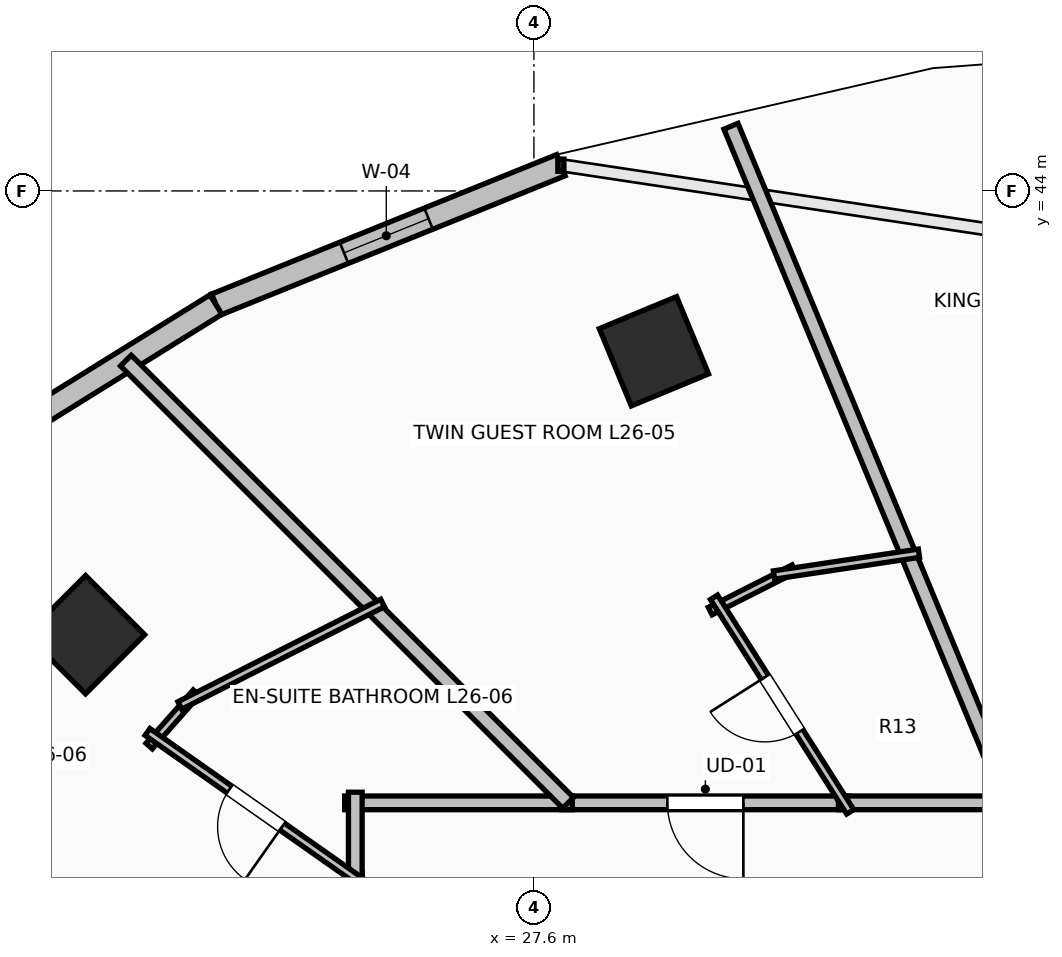
"""IFC4 building model, lengths in metres.
Left out: names, types, materials, properties, quantities, classifications, styles, units other than length and angle.
Written with IfcOpenShell. Run it as: python <this file> out.ifc"""

import sys

from ifc_helpers import new_model, si_unit, direction, frame, frame_2d, origin, origin_2d, place, context, subcontext, project, spatial, rectangle, extrude, element, fill, save


model = new_model("IFC4")
c1 = context("Model", 3, precision=1e-05, world=origin(), true_north=direction((0.0, 1.0)))
c2 = subcontext(c1, "Body", "Model", "MODEL_VIEW")
j1 = project(units=[si_unit("LENGTHUNIT", "METRE"), si_unit("PLANEANGLEUNIT", "RADIAN")], contexts=[c1])
p1 = place(None, origin())
s1 = spatial("IfcSite", under=j1, at=p1, CompositionType="ELEMENT")
p2 = place(p1, origin())
s2 = spatial("IfcBuilding", under=s1, at=p2, CompositionType="ELEMENT")
p3 = place(p2, frame((0.0, 0.0, 99.8)))
s3 = spatial("IfcBuildingStorey", under=s2, at=p3, CompositionType="ELEMENT", Elevation=99.8)
for number, where, z_axis, x_axis in (
    (1, (29.179, 41.891, 0.0), (0.0, 0.0, 1.0), (-0.383, 0.924, 0.0)),
    (2, (21.701, 38.162, 0.0), (0.0, 0.0, 1.0), (-0.707, 0.707, 0.0)),
):
    element("IfcColumn", number, at=place(p3, frame(where, z_axis=z_axis, x_axis=x_axis)), inside=s3, PredefinedType="COLUMN", context=c2, shape_type="SweptSolid", body=[
        extrude(rectangle(XDim=1.1, YDim=1.1, at=origin_2d()), origin(), (0.0, 0.0, 1.0), 3.5),
    ])
p4 = place(p3, frame((27.955, 44.339, 0.0), z_axis=(0.0, 0.0, 1.0), x_axis=(-0.927122233109, -0.374759075775, 0.0)))
e3 = element("IfcWall", 3, at=p4, inside=s3, PredefinedType="STANDARD", context=c2, shape_type="SweptSolid", body=[
    extrude(rectangle(XDim=4.895, YDim=0.3, at=frame_2d((2.448, 0.0))), origin(), (0.0, 0.0, 1.0), 3.24),
])
p5 = place(p4, frame((1.877, 0.0, 0.85)))
e4 = element("IfcOpeningElement", 4, at=p5, cuts=e3, PredefinedType="OPENING", context=c2, shape_type="SweptSolid", body=[
    extrude(rectangle(XDim=1.2, YDim=1.95, at=frame_2d((0.6, 0.975))), frame((0.0, 0.165, 0.0), z_axis=(0.0, -1.0, 0.0), x_axis=(1.0, 0.0, 0.0)), (0.0, 0.0, 1.0), 0.33),
])
p6 = place(p3, frame((23.416, 42.505, 0.0), z_axis=(0.0, 0.0, 1.0), x_axis=(-0.849684479743, -0.527291461038, 0.0)))
e5 = element("IfcWall", 5, at=p6, inside=s3, PredefinedType="STANDARD", context=c2, shape_type="SweptSolid", body=[
    extrude(rectangle(XDim=4.681, YDim=0.3, at=frame_2d((2.341, 0.0))), origin(), (0.0, 0.0, 1.0), 3.24),
])
p7 = place(p3, frame((31.746, 35.95, 0.0), z_axis=(0.0, 0.0, 1.0), x_axis=(-1.0, 0.0, 0.0)))
e6 = element("IfcWall", 6, at=p7, inside=s3, PredefinedType="PARTITIONING", context=c2, shape_type="SweptSolid", body=[
    extrude(rectangle(XDim=3.781, YDim=0.18, at=frame_2d((1.891, 0.0))), origin(), (0.0, 0.0, 1.0), 2.432),
])
p8 = place(p7, frame((1.39, 0.0, 0.0)))
e7 = element("IfcOpeningElement", 7, at=p8, cuts=e6, PredefinedType="OPENING", context=c2, shape_type="SweptSolid", body=[
    extrude(rectangle(XDim=1.0, YDim=2.15, at=frame_2d((0.5, 1.075))), frame((0.0, 0.105, 0.0), z_axis=(0.0, -1.0, 0.0), x_axis=(1.0, 0.0, 0.0)), (0.0, 0.0, 1.0), 0.21),
])
p9 = place(p3, frame((33.954, 35.95, 0.0), z_axis=(0.0, 0.0, 1.0), x_axis=(-1.0, 0.0, 0.0)))
e8 = element("IfcWall", 8, at=p9, inside=s3, PredefinedType="PARTITIONING", context=c2, shape_type="SweptSolid", body=[
    extrude(rectangle(XDim=2.348, YDim=0.18, at=frame_2d((1.174, 0.0))), origin(), (0.0, 0.0, 1.0), 3.24),
])
p10 = place(p3, frame((25.25, 35.034, 0.0), z_axis=(0.0, 0.0, 1.0), x_axis=(0.0, -1.0, 0.0)))
e9 = element("IfcWall", 9, at=p10, inside=s3, PredefinedType="PARTITIONING", context=c2, shape_type="SweptSolid", body=[
    extrude(rectangle(XDim=3.813, YDim=0.18, at=frame_2d((1.906, 0.0))), origin(), (0.0, 0.0, 1.0), 2.432),
])
p11 = place(p10, frame((1.406, 0.0, 0.0)))
e10 = element("IfcOpeningElement", 10, at=p11, cuts=e9, PredefinedType="OPENING", context=c2, shape_type="SweptSolid", body=[
    extrude(rectangle(XDim=1.0, YDim=2.15, at=frame_2d((0.5, 1.075))), frame((0.0, 0.105, 0.0), z_axis=(0.0, -1.0, 0.0), x_axis=(1.0, 0.0, 0.0)), (0.0, 0.0, 1.0), 0.21),
])
p12 = place(p3, frame((28.105, 35.95, 0.0), z_axis=(0.0, 0.0, 1.0), x_axis=(-1.0, 0.0, 0.0)))
e11 = element("IfcWall", 11, at=p12, inside=s3, PredefinedType="PARTITIONING", context=c2, shape_type="SweptSolid", body=[
    extrude(rectangle(XDim=2.995, YDim=0.18, at=frame_2d((1.498, 0.0))), origin(), (0.0, 0.0, 1.0), 2.432),
])
p13 = place(p3, frame((25.25, 36.09, 0.0), z_axis=(0.0, 0.0, 1.0), x_axis=(0.0, -1.0, 0.0)))
e12 = element("IfcWall", 12, at=p13, inside=s3, PredefinedType="PARTITIONING", context=c2, shape_type="SweptSolid", body=[
    extrude(rectangle(XDim=1.196, YDim=0.18, at=frame_2d((0.598, 0.0))), origin(), (0.0, 0.0, 1.0), 2.432),
])
p14 = place(p3, frame((30.192, 44.851, 0.0), z_axis=(0.0, 0.0, 1.0), x_axis=(0.382687492799, -0.923877850614, 0.0)))
e13 = element("IfcWall", 13, at=p14, inside=s3, PredefinedType="PARTITIONING", context=c2, shape_type="SweptSolid", body=[
    extrude(rectangle(XDim=9.635, YDim=0.2, at=frame_2d((4.817, 0.0))), origin(), (0.0, 0.0, 1.0), 2.432),
])
p15 = place(p3, frame((29.919, 38.473, 0.0), z_axis=(0.0, 0.0, 1.0), x_axis=(0.892084606746, 0.45186840386, 0.0)))
e14 = element("IfcWall", 14, at=p15, inside=s3, PredefinedType="PARTITIONING", context=c2, shape_type="SweptSolid", body=[
    extrude(rectangle(XDim=1.236, YDim=0.11, at=frame_2d((0.618, 0.0))), origin(), (0.0, 0.0, 1.0), 3.24),
])
p16 = place(p3, frame((30.759, 38.947, 0.0), z_axis=(0.0, 0.0, 1.0), x_axis=(0.988889867338, 0.148650026153, 0.0)))
e15 = element("IfcWall", 15, at=p16, inside=s3, PredefinedType="PARTITIONING", context=c2, shape_type="SweptSolid", body=[
    extrude(rectangle(XDim=1.928, YDim=0.11, at=frame_2d((0.964, 0.0))), origin(), (0.0, 0.0, 1.0), 3.24),
])
p17 = place(p3, frame((31.761, 35.832, 0.0), z_axis=(0.0, 0.0, 1.0), x_axis=(-0.535991614842, 0.844223305067, 0.0)))
e16 = element("IfcWall", 16, at=p17, inside=s3, PredefinedType="PARTITIONING", context=c2, shape_type="SweptSolid", body=[
    extrude(rectangle(XDim=3.343, YDim=0.11, at=frame_2d((1.672, 0.0))), origin(), (0.0, 0.0, 1.0), 2.432),
])
p18 = place(p17, frame((1.247, 0.0, 0.0)))
e17 = element("IfcOpeningElement", 17, at=p18, cuts=e16, PredefinedType="OPENING", context=c2, shape_type="SweptSolid", body=[
    extrude(rectangle(XDim=0.85, YDim=2.1, at=frame_2d((0.425, 1.05))), frame((0.0, 0.07, 0.0), z_axis=(0.0, -1.0, 0.0), x_axis=(1.0, 0.0, 0.0)), (0.0, 0.0, 1.0), 0.14),
])
p19 = place(p3, frame((22.232, 41.768, 0.0), z_axis=(0.0, 0.0, 1.0), x_axis=(0.707106781187, -0.707106781187, 0.0)))
e18 = element("IfcWall", 18, at=p19, inside=s3, PredefinedType="PARTITIONING", context=c2, shape_type="SweptSolid", body=[
    extrude(rectangle(XDim=8.228, YDim=0.2, at=frame_2d((4.114, 0.0))), origin(), (0.0, 0.0, 1.0), 2.432),
])
p20 = place(p3, frame((22.538, 36.697, 0.0), z_axis=(0.0, 0.0, 1.0), x_axis=(0.662242037053, 0.749289986827, 0.0)))
e19 = element("IfcWall", 19, at=p20, inside=s3, PredefinedType="PARTITIONING", context=c2, shape_type="SweptSolid", body=[
    extrude(rectangle(XDim=0.937, YDim=0.11, at=frame_2d((0.468, 0.0))), origin(), (0.0, 0.0, 1.0), 2.432),
])
p21 = place(p3, frame((22.941, 37.231, 0.0), z_axis=(0.0, 0.0, 1.0), x_axis=(0.892507731149, 0.451032094024, 0.0)))
e20 = element("IfcWall", 20, at=p21, inside=s3, PredefinedType="PARTITIONING", context=c2, shape_type="SweptSolid", body=[
    extrude(rectangle(XDim=2.989, YDim=0.11, at=frame_2d((1.495, 0.0))), origin(), (0.0, 0.0, 1.0), 2.432),
])
p22 = place(p3, frame((25.365, 34.881, 0.0), z_axis=(0.0, 0.0, 1.0), x_axis=(-0.81809360258, 0.575085087111, 0.0)))
e21 = element("IfcWall", 21, at=p22, inside=s3, PredefinedType="PARTITIONING", context=c2, shape_type="SweptSolid", body=[
    extrude(rectangle(XDim=3.481, YDim=0.11, at=frame_2d((1.741, 0.0))), origin(), (0.0, 0.0, 1.0), 2.432),
])
p23 = place(p22, frame((1.316, 0.0, 0.0)))
e22 = element("IfcOpeningElement", 22, at=p23, cuts=e21, PredefinedType="OPENING", context=c2, shape_type="SweptSolid", body=[
    extrude(rectangle(XDim=0.85, YDim=2.1, at=frame_2d((0.425, 1.05))), frame((0.0, 0.07, 0.0), z_axis=(0.0, -1.0, 0.0), x_axis=(1.0, 0.0, 0.0)), (0.0, 0.0, 1.0), 0.14),
])
p24 = place(p3, frame((15.089, 35.49, 0.0), z_axis=(0.0, 0.0, 1.0), x_axis=(0.923888472039, -0.382661849723, 0.0)))
e23 = element("IfcWall", 23, at=p24, inside=s3, PredefinedType="PARTITIONING", context=c2, shape_type="SweptSolid", body=[
    extrude(rectangle(XDim=7.51, YDim=0.2, at=frame_2d((3.755, 0.0))), origin(), (0.0, 0.0, 1.0), 2.677),
])
p25 = place(p5, origin())
e24 = element("IfcWindow", 24, at=p25, inside=s3, PartitioningType="SINGLE_PANEL", PredefinedType="WINDOW", context=c2, shape_type="SweptSolid", body=[
    extrude(rectangle(XDim=1.2, YDim=1.95, at=frame_2d((0.6, 0.975))), frame((0.0, 0.03, 0.0), z_axis=(0.0, -1.0, 0.0), x_axis=(1.0, 0.0, 0.0)), (0.0, 0.0, 1.0), 0.06),
])
fill(e4, e24)
p26 = place(p8, origin())
e25 = element("IfcDoor", 25, at=p26, inside=s3, OperationType="SINGLE_SWING_LEFT", PredefinedType="DOOR", context=c2, shape_type="SweptSolid", body=[
    extrude(rectangle(XDim=1.0, YDim=2.15, at=frame_2d((0.5, 1.075))), frame((0.0, 0.025, 0.0), z_axis=(0.0, -1.0, 0.0), x_axis=(1.0, 0.0, 0.0)), (0.0, 0.0, 1.0), 0.05),
])
fill(e7, e25)
p27 = place(p18, origin())
e26 = element("IfcDoor", 26, at=p27, inside=s3, OperationType="SINGLE_SWING_RIGHT", PredefinedType="DOOR", context=c2, shape_type="SweptSolid", body=[
    extrude(rectangle(XDim=0.85, YDim=2.1, at=frame_2d((0.425, 1.05))), frame((0.0, 0.025, 0.0), z_axis=(0.0, -1.0, 0.0), x_axis=(1.0, 0.0, 0.0)), (0.0, 0.0, 1.0), 0.05),
])
fill(e17, e26)
p28 = place(p23, origin())
e27 = element("IfcDoor", 27, at=p28, inside=s3, OperationType="SINGLE_SWING_LEFT", PredefinedType="DOOR", context=c2, shape_type="SweptSolid", body=[
    extrude(rectangle(XDim=0.85, YDim=2.1, at=frame_2d((0.425, 1.05))), frame((0.0, 0.025, 0.0), z_axis=(0.0, -1.0, 0.0), x_axis=(1.0, 0.0, 0.0)), (0.0, 0.0, 1.0), 0.05),
])
fill(e22, e27)
save(model, sys.argv[1])
